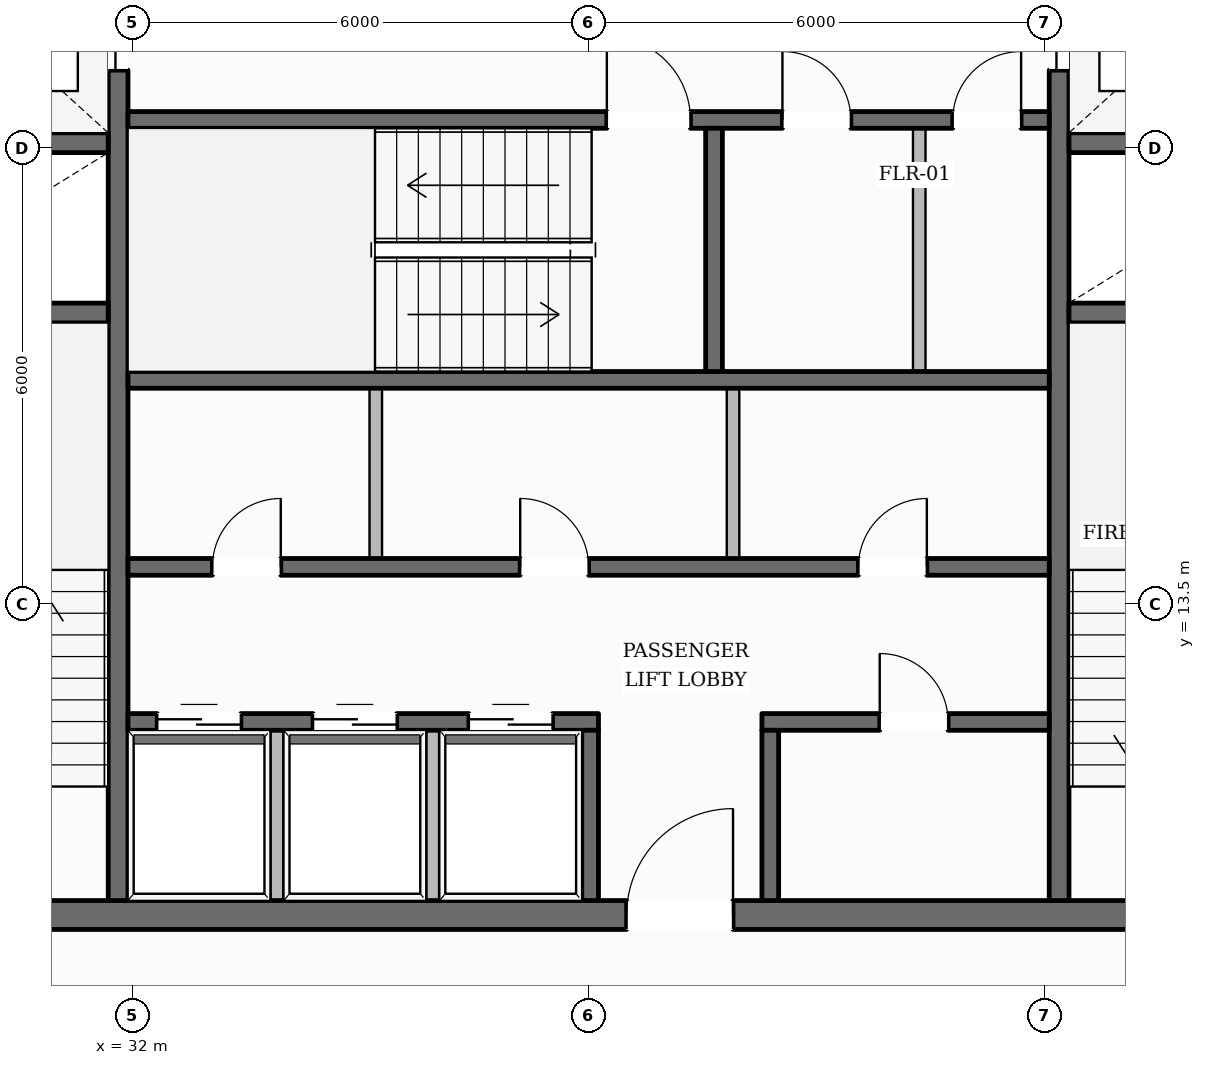
"""IFC4 building model, lengths in metres.
Left out: names, types, materials, properties, quantities, classifications, styles, units other than length and angle.
Written with IfcOpenShell. Run it as: python <this file> out.ifc"""

import sys

from ifc_helpers import new_model, si_unit, direction, frame, frame_2d, origin, place, context, subcontext, project, spatial, rectangle, extrude, element, fill, save


model = new_model("IFC4")
c1 = context("Model", 3, precision=1e-05, world=origin(), true_north=direction((0.0, 1.0)))
c2 = subcontext(c1, "Body", "Model", "MODEL_VIEW")
j1 = project(units=[si_unit("LENGTHUNIT", "METRE"), si_unit("PLANEANGLEUNIT", "RADIAN")], contexts=[c1])
p1 = place(None, origin())
s1 = spatial("IfcSite", under=j1, at=p1, CompositionType="ELEMENT")
p2 = place(p1, origin())
s2 = spatial("IfcBuilding", under=s1, at=p2, CompositionType="ELEMENT")
p3 = place(p2, frame((0.0, 0.0, 243.35)))
s3 = spatial("IfcBuildingStorey", under=s2, at=p3, CompositionType="ELEMENT", Elevation=243.35)
p4 = place(p3, frame((28.1, 9.41, 0.0), z_axis=(0.0, 0.0, 1.0), x_axis=(1.0, 0.0, 0.0)))
e1 = element("IfcWall", 1, at=p4, inside=s3, PredefinedType="SOLIDWALL", context=c2, shape_type="SweptSolid", body=[
    extrude(rectangle(XDim=19.8, YDim=0.38, at=frame_2d((9.9, 0.0))), origin(), (0.0, 0.0, 1.0), 3.61),
])
p5 = place(p4, frame((10.4, 0.0, 0.0)))
e2 = element("IfcOpeningElement", 2, at=p5, cuts=e1, PredefinedType="OPENING", context=c2, shape_type="SweptSolid", body=[
    extrude(rectangle(XDim=1.4, YDim=2.2, at=frame_2d((0.7, 1.1))), frame((0.0, 0.2, 0.0), z_axis=(0.0, -1.0, 0.0), x_axis=(1.0, 0.0, 0.0)), (0.0, 0.0, 1.0), 0.4),
])
p6 = place(p3, frame((31.81, 9.6, 0.0), z_axis=(0.0, 0.0, 1.0), x_axis=(0.0, 1.0, 0.0)))
e3 = element("IfcWall", 3, at=p6, inside=s3, PredefinedType="SHEAR", context=c2, shape_type="SweptSolid", body=[
    extrude(rectangle(XDim=13.0, YDim=0.26, at=frame_2d((6.5, 0.0))), origin(), (0.0, 0.0, 1.0), 3.61),
])
p7 = place(p6, frame((10.925, 0.0, 0.0)))
e4 = element("IfcOpeningElement", 4, at=p7, cuts=e3, PredefinedType="OPENING", context=c2, shape_type="SweptSolid", body=[
    extrude(rectangle(XDim=1.25, YDim=2.25, at=frame_2d((0.625, 1.125))), frame((0.0, 0.14, 0.0), z_axis=(0.0, -1.0, 0.0), x_axis=(1.0, 0.0, 0.0)), (0.0, 0.0, 1.0), 0.28),
])
p8 = place(p3, frame((44.19, 9.6, 0.0), z_axis=(0.0, 0.0, 1.0), x_axis=(0.0, 1.0, 0.0)))
e5 = element("IfcWall", 5, at=p8, inside=s3, PredefinedType="SHEAR", context=c2, shape_type="SweptSolid", body=[
    extrude(rectangle(XDim=13.0, YDim=0.26, at=frame_2d((6.5, 0.0))), origin(), (0.0, 0.0, 1.0), 3.61),
])
p9 = place(p8, frame((10.925, 0.0, 0.0)))
e6 = element("IfcOpeningElement", 6, at=p9, cuts=e5, PredefinedType="OPENING", context=c2, shape_type="SweptSolid", body=[
    extrude(rectangle(XDim=1.25, YDim=2.25, at=frame_2d((0.625, 1.125))), frame((0.0, 0.14, 0.0), z_axis=(0.0, -1.0, 0.0), x_axis=(1.0, 0.0, 0.0)), (0.0, 0.0, 1.0), 0.28),
])
for number, where, z_axis, x_axis in (
    (7, (28.48, 17.33, 0.0), (0.0, 0.0, 1.0), (1.0, 0.0, 0.0)),
    (8, (28.48, 19.57, 0.0), (0.0, 0.0, 1.0), (1.0, 0.0, 0.0)),
    (9, (44.32, 17.33, 0.0), (0.0, 0.0, 1.0), (1.0, 0.0, 0.0)),
    (10, (44.32, 19.57, 0.0), (0.0, 0.0, 1.0), (1.0, 0.0, 0.0)),
):
    element("IfcWall", number, at=place(p3, frame(where, z_axis=z_axis, x_axis=x_axis)), inside=s3, PredefinedType="SHEAR", context=c2, shape_type="SweptSolid", body=[
        extrude(rectangle(XDim=3.2, YDim=0.26, at=frame_2d((1.6, 0.0))), origin(), (0.0, 0.0, 1.0), 3.61),
    ])
p10 = place(p3, frame((31.94, 19.87, 0.0), z_axis=(0.0, 0.0, 1.0), x_axis=(1.0, 0.0, 0.0)))
e11 = element("IfcWall", 11, at=p10, inside=s3, PredefinedType="SOLIDWALL", context=c2, shape_type="SweptSolid", body=[
    extrude(rectangle(XDim=12.12, YDim=0.22, at=frame_2d((6.06, 0.0))), origin(), (0.0, 0.0, 1.0), 3.61),
])
p11 = place(p10, frame((6.3, 0.0, 0.0)))
e12 = element("IfcOpeningElement", 12, at=p11, cuts=e11, PredefinedType="OPENING", context=c2, shape_type="SweptSolid", body=[
    extrude(rectangle(XDim=1.1, YDim=2.15, at=frame_2d((0.55, 1.075))), frame((0.0, 0.12, 0.0), z_axis=(0.0, -1.0, 0.0), x_axis=(1.0, 0.0, 0.0)), (0.0, 0.0, 1.0), 0.24),
])
p12 = place(p10, frame((8.61, 0.0, 0.0)))
e13 = element("IfcOpeningElement", 13, at=p12, cuts=e11, PredefinedType="OPENING", context=c2, shape_type="SweptSolid", body=[
    extrude(rectangle(XDim=0.9, YDim=2.1, at=frame_2d((0.45, 1.05))), frame((0.0, 0.12, 0.0), z_axis=(0.0, -1.0, 0.0), x_axis=(1.0, 0.0, 0.0)), (0.0, 0.0, 1.0), 0.24),
])
p13 = place(p10, frame((10.85, 0.0, 0.0)))
e14 = element("IfcOpeningElement", 14, at=p13, cuts=e11, PredefinedType="OPENING", context=c2, shape_type="SweptSolid", body=[
    extrude(rectangle(XDim=0.9, YDim=2.1, at=frame_2d((0.45, 1.05))), frame((0.0, 0.12, 0.0), z_axis=(0.0, -1.0, 0.0), x_axis=(1.0, 0.0, 0.0)), (0.0, 0.0, 1.0), 0.24),
])
p14 = place(p3, frame((31.94, 16.45, 0.0), z_axis=(0.0, 0.0, 1.0), x_axis=(1.0, 0.0, 0.0)))
e15 = element("IfcWall", 15, at=p14, inside=s3, PredefinedType="SOLIDWALL", context=c2, shape_type="SweptSolid", body=[
    extrude(rectangle(XDim=12.12, YDim=0.22, at=frame_2d((6.06, 0.0))), origin(), (0.0, 0.0, 1.0), 3.61),
])
p15 = place(p3, frame((39.65, 16.56, 0.0), z_axis=(0.0, 0.0, 1.0), x_axis=(0.0, 1.0, 0.0)))
e16 = element("IfcWall", 16, at=p15, inside=s3, PredefinedType="SOLIDWALL", context=c2, shape_type="SweptSolid", body=[
    extrude(rectangle(XDim=3.2, YDim=0.22, at=frame_2d((1.6, 0.0))), origin(), (0.0, 0.0, 1.0), 3.61),
])
p16 = place(p3, frame((31.94, 13.99, 0.0), z_axis=(0.0, 0.0, 1.0), x_axis=(1.0, 0.0, 0.0)))
e17 = element("IfcWall", 17, at=p16, inside=s3, PredefinedType="SOLIDWALL", context=c2, shape_type="SweptSolid", body=[
    extrude(rectangle(XDim=12.12, YDim=0.22, at=frame_2d((6.06, 0.0))), origin(), (0.0, 0.0, 1.0), 3.61),
])
p17 = place(p16, frame((1.11, 0.0, 0.0)))
e18 = element("IfcOpeningElement", 18, at=p17, cuts=e17, PredefinedType="OPENING", context=c2, shape_type="SweptSolid", body=[
    extrude(rectangle(XDim=0.9, YDim=2.1, at=frame_2d((0.45, 1.05))), frame((0.0, 0.12, 0.0), z_axis=(0.0, -1.0, 0.0), x_axis=(1.0, 0.0, 0.0)), (0.0, 0.0, 1.0), 0.24),
])
p18 = place(p16, frame((5.16, 0.0, 0.0)))
e19 = element("IfcOpeningElement", 19, at=p18, cuts=e17, PredefinedType="OPENING", context=c2, shape_type="SweptSolid", body=[
    extrude(rectangle(XDim=0.9, YDim=2.1, at=frame_2d((0.45, 1.05))), frame((0.0, 0.12, 0.0), z_axis=(0.0, -1.0, 0.0), x_axis=(1.0, 0.0, 0.0)), (0.0, 0.0, 1.0), 0.24),
])
p19 = place(p16, frame((9.61, 0.0, 0.0)))
e20 = element("IfcOpeningElement", 20, at=p19, cuts=e17, PredefinedType="OPENING", context=c2, shape_type="SweptSolid", body=[
    extrude(rectangle(XDim=0.9, YDim=2.1, at=frame_2d((0.45, 1.05))), frame((0.0, 0.12, 0.0), z_axis=(0.0, -1.0, 0.0), x_axis=(1.0, 0.0, 0.0)), (0.0, 0.0, 1.0), 0.24),
])
p20 = place(p3, frame((31.94, 11.95, 0.0), z_axis=(0.0, 0.0, 1.0), x_axis=(1.0, 0.0, 0.0)))
e21 = element("IfcWall", 21, at=p20, inside=s3, PredefinedType="SOLIDWALL", context=c2, shape_type="SweptSolid", body=[
    extrude(rectangle(XDim=6.19, YDim=0.22, at=frame_2d((3.095, 0.0))), origin(), (0.0, 0.0, 1.0), 3.61),
])
p21 = place(p20, frame((0.385, 0.0, 0.0)))
e22 = element("IfcOpeningElement", 22, at=p21, cuts=e21, PredefinedType="OPENING", context=c2, shape_type="SweptSolid", body=[
    extrude(rectangle(XDim=1.1, YDim=2.2, at=frame_2d((0.55, 1.1))), frame((0.0, 0.12, 0.0), z_axis=(0.0, -1.0, 0.0), x_axis=(1.0, 0.0, 0.0)), (0.0, 0.0, 1.0), 0.24),
])
p22 = place(p20, frame((2.435, 0.0, 0.0)))
e23 = element("IfcOpeningElement", 23, at=p22, cuts=e21, PredefinedType="OPENING", context=c2, shape_type="SweptSolid", body=[
    extrude(rectangle(XDim=1.1, YDim=2.2, at=frame_2d((0.55, 1.1))), frame((0.0, 0.12, 0.0), z_axis=(0.0, -1.0, 0.0), x_axis=(1.0, 0.0, 0.0)), (0.0, 0.0, 1.0), 0.24),
])
p23 = place(p20, frame((4.485, 0.0, 0.0)))
e24 = element("IfcOpeningElement", 24, at=p23, cuts=e21, PredefinedType="OPENING", context=c2, shape_type="SweptSolid", body=[
    extrude(rectangle(XDim=1.1, YDim=2.2, at=frame_2d((0.55, 1.1))), frame((0.0, 0.12, 0.0), z_axis=(0.0, -1.0, 0.0), x_axis=(1.0, 0.0, 0.0)), (0.0, 0.0, 1.0), 0.24),
])
p24 = place(p3, frame((40.28, 11.95, 0.0), z_axis=(0.0, 0.0, 1.0), x_axis=(1.0, 0.0, 0.0)))
e25 = element("IfcWall", 25, at=p24, inside=s3, PredefinedType="SOLIDWALL", context=c2, shape_type="SweptSolid", body=[
    extrude(rectangle(XDim=3.78, YDim=0.22, at=frame_2d((1.89, 0.0))), origin(), (0.0, 0.0, 1.0), 3.61),
])
p25 = place(p24, frame((1.55, 0.0, 0.0)))
e26 = element("IfcOpeningElement", 26, at=p25, cuts=e25, PredefinedType="OPENING", context=c2, shape_type="SweptSolid", body=[
    extrude(rectangle(XDim=0.9, YDim=2.1, at=frame_2d((0.45, 1.05))), frame((0.0, 0.12, 0.0), z_axis=(0.0, -1.0, 0.0), x_axis=(1.0, 0.0, 0.0)), (0.0, 0.0, 1.0), 0.24),
])
for number, where, z_axis, x_axis in (
    (27, (38.02, 9.6, 0.0), (0.0, 0.0, 1.0), (0.0, 1.0, 0.0)),
    (28, (40.39, 9.6, 0.0), (0.0, 0.0, 1.0), (0.0, 1.0, 0.0)),
):
    element("IfcWall", number, at=place(p3, frame(where, z_axis=z_axis, x_axis=x_axis)), inside=s3, PredefinedType="SOLIDWALL", context=c2, shape_type="SweptSolid", body=[
        extrude(rectangle(XDim=2.24, YDim=0.22, at=frame_2d((1.12, 0.0))), origin(), (0.0, 0.0, 1.0), 3.61),
    ])
p26 = place(p3, frame((16.275, 11.379, 0.0), z_axis=(0.0, 0.0, 1.0), x_axis=(0.490746172412, 0.871302584791, 0.0)))
e29 = element("IfcWall", 29, at=p26, inside=s3, PredefinedType="STANDARD", context=c2, shape_type="SweptSolid", body=[
    extrude(rectangle(XDim=37.617, YDim=0.35, at=frame_2d((18.809, 0.0))), origin(), (0.0, 0.0, 1.0), 3.196),
])
p27 = place(p26, frame((33.404, 0.0, 0.65)))
e30 = element("IfcOpeningElement", 30, at=p27, cuts=e29, PredefinedType="OPENING", context=c2, shape_type="SweptSolid", body=[
    extrude(rectangle(XDim=1.35, YDim=1.75, at=frame_2d((0.675, 0.875))), frame((0.0, 0.185, 0.0), z_axis=(0.0, -1.0, 0.0), x_axis=(1.0, 0.0, 0.0)), (0.0, 0.0, 1.0), 0.37),
])
p28 = place(p26, frame((27.294, 0.0, 0.65)))
e31 = element("IfcOpeningElement", 31, at=p28, cuts=e29, PredefinedType="OPENING", context=c2, shape_type="SweptSolid", body=[
    extrude(rectangle(XDim=1.35, YDim=1.75, at=frame_2d((0.675, 0.875))), frame((0.0, 0.185, 0.0), z_axis=(0.0, -1.0, 0.0), x_axis=(1.0, 0.0, 0.0)), (0.0, 0.0, 1.0), 0.37),
])
p29 = place(p26, frame((15.073, 0.0, 0.65)))
e32 = element("IfcOpeningElement", 32, at=p29, cuts=e29, PredefinedType="OPENING", context=c2, shape_type="SweptSolid", body=[
    extrude(rectangle(XDim=1.35, YDim=1.75, at=frame_2d((0.675, 0.875))), frame((0.0, 0.185, 0.0), z_axis=(0.0, -1.0, 0.0), x_axis=(1.0, 0.0, 0.0)), (0.0, 0.0, 1.0), 0.37),
])
p30 = place(p26, frame((8.963, 0.0, 0.65)))
e33 = element("IfcOpeningElement", 33, at=p30, cuts=e29, PredefinedType="OPENING", context=c2, shape_type="SweptSolid", body=[
    extrude(rectangle(XDim=1.35, YDim=1.75, at=frame_2d((0.675, 0.875))), frame((0.0, 0.185, 0.0), z_axis=(0.0, -1.0, 0.0), x_axis=(1.0, 0.0, 0.0)), (0.0, 0.0, 1.0), 0.37),
])
p31 = place(p26, frame((2.853, 0.0, 0.65)))
e34 = element("IfcOpeningElement", 34, at=p31, cuts=e29, PredefinedType="OPENING", context=c2, shape_type="SweptSolid", body=[
    extrude(rectangle(XDim=1.35, YDim=1.75, at=frame_2d((0.675, 0.875))), frame((0.0, 0.185, 0.0), z_axis=(0.0, -1.0, 0.0), x_axis=(1.0, 0.0, 0.0)), (0.0, 0.0, 1.0), 0.37),
])
p32 = place(p3, frame((41.362, 44.097, 0.0), z_axis=(0.0, 0.0, 1.0), x_axis=(0.497556414716, -0.867431619308, 0.0)))
e35 = element("IfcWall", 35, at=p32, inside=s3, PredefinedType="STANDARD", context=c2, shape_type="SweptSolid", body=[
    extrude(rectangle(XDim=38.118, YDim=0.35, at=frame_2d((19.059, 0.0))), origin(), (0.0, 0.0, 1.0), 3.196),
])
p33 = place(p32, frame((33.873, 0.0, 0.65)))
e36 = element("IfcOpeningElement", 36, at=p33, cuts=e35, PredefinedType="OPENING", context=c2, shape_type="SweptSolid", body=[
    extrude(rectangle(XDim=1.35, YDim=1.75, at=frame_2d((0.675, 0.875))), frame((0.0, 0.185, 0.0), z_axis=(0.0, -1.0, 0.0), x_axis=(1.0, 0.0, 0.0)), (0.0, 0.0, 1.0), 0.37),
])
p34 = place(p32, frame((27.678, 0.0, 0.65)))
e37 = element("IfcOpeningElement", 37, at=p34, cuts=e35, PredefinedType="OPENING", context=c2, shape_type="SweptSolid", body=[
    extrude(rectangle(XDim=1.35, YDim=1.75, at=frame_2d((0.675, 0.875))), frame((0.0, 0.185, 0.0), z_axis=(0.0, -1.0, 0.0), x_axis=(1.0, 0.0, 0.0)), (0.0, 0.0, 1.0), 0.37),
])
p35 = place(p32, frame((15.288, 0.0, 0.65)))
e38 = element("IfcOpeningElement", 38, at=p35, cuts=e35, PredefinedType="OPENING", context=c2, shape_type="SweptSolid", body=[
    extrude(rectangle(XDim=1.35, YDim=1.75, at=frame_2d((0.675, 0.875))), frame((0.0, 0.185, 0.0), z_axis=(0.0, -1.0, 0.0), x_axis=(1.0, 0.0, 0.0)), (0.0, 0.0, 1.0), 0.37),
])
p36 = place(p32, frame((9.093, 0.0, 0.65)))
e39 = element("IfcOpeningElement", 39, at=p36, cuts=e35, PredefinedType="OPENING", context=c2, shape_type="SweptSolid", body=[
    extrude(rectangle(XDim=1.35, YDim=1.75, at=frame_2d((0.675, 0.875))), frame((0.0, 0.185, 0.0), z_axis=(0.0, -1.0, 0.0), x_axis=(1.0, 0.0, 0.0)), (0.0, 0.0, 1.0), 0.37),
])
p37 = place(p32, frame((2.898, 0.0, 0.65)))
e40 = element("IfcOpeningElement", 40, at=p37, cuts=e35, PredefinedType="OPENING", context=c2, shape_type="SweptSolid", body=[
    extrude(rectangle(XDim=1.35, YDim=1.75, at=frame_2d((0.675, 0.875))), frame((0.0, 0.185, 0.0), z_axis=(0.0, -1.0, 0.0), x_axis=(1.0, 0.0, 0.0)), (0.0, 0.0, 1.0), 0.37),
])
for number, where, z_axis, x_axis in (
    (41, (33.9, 9.49, 0.0), (0.0, 0.0, 1.0), (0.0, 1.0, 0.0)),
    (42, (35.95, 9.49, 0.0), (0.0, 0.0, 1.0), (0.0, 1.0, 0.0)),
):
    element("IfcWall", number, at=place(p3, frame(where, z_axis=z_axis, x_axis=x_axis)), inside=s3, PredefinedType="PARTITIONING", context=c2, shape_type="SweptSolid", body=[
        extrude(rectangle(XDim=2.35, YDim=0.165, at=frame_2d((1.175, 0.0))), origin(), (0.0, 0.0, 1.0), 3.61),
    ])
for number, where, z_axis, x_axis in (
    (43, (35.2, 14.1, 0.0), (0.0, 0.0, 1.0), (0.0, 1.0, 0.0)),
    (44, (39.9, 14.1, 0.0), (0.0, 0.0, 1.0), (0.0, 1.0, 0.0)),
):
    element("IfcWall", number, at=place(p3, frame(where, z_axis=z_axis, x_axis=x_axis)), inside=s3, PredefinedType="PARTITIONING", context=c2, shape_type="SweptSolid", body=[
        extrude(rectangle(XDim=2.24, YDim=0.165, at=frame_2d((1.12, 0.0))), origin(), (0.0, 0.0, 1.0), 3.61),
    ])
p38 = place(p3, frame((42.35, 16.56, 0.0), z_axis=(0.0, 0.0, 1.0), x_axis=(0.0, 1.0, 0.0)))
e45 = element("IfcWall", 45, at=p38, inside=s3, PredefinedType="PARTITIONING", context=c2, shape_type="SweptSolid", body=[
    extrude(rectangle(XDim=3.2, YDim=0.165, at=frame_2d((1.6, 0.0))), origin(), (0.0, 0.0, 1.0), 3.61),
])
p39 = place(p11, origin())
e46 = element("IfcDoor", 46, at=p39, inside=s3, OperationType="SINGLE_SWING_LEFT", PredefinedType="DOOR", context=c2, shape_type="SweptSolid", body=[
    extrude(rectangle(XDim=1.1, YDim=2.15, at=frame_2d((0.55, 1.075))), frame((0.0, 0.025, 0.0), z_axis=(0.0, -1.0, 0.0), x_axis=(1.0, 0.0, 0.0)), (0.0, 0.0, 1.0), 0.05),
])
fill(e12, e46)
p40 = place(p7, origin())
e47 = element("IfcDoor", 47, at=p40, inside=s3, OperationType="DOUBLE_DOOR_SLIDING", PredefinedType="DOOR", context=c2, shape_type="SweptSolid", body=[
    extrude(rectangle(XDim=1.25, YDim=2.25, at=frame_2d((0.625, 1.125))), frame((0.0, 0.025, 0.0), z_axis=(0.0, -1.0, 0.0), x_axis=(1.0, 0.0, 0.0)), (0.0, 0.0, 1.0), 0.05),
])
fill(e4, e47)
p41 = place(p9, origin())
e48 = element("IfcDoor", 48, at=p41, inside=s3, OperationType="DOUBLE_DOOR_SLIDING", PredefinedType="DOOR", context=c2, shape_type="SweptSolid", body=[
    extrude(rectangle(XDim=1.25, YDim=2.25, at=frame_2d((0.625, 1.125))), frame((0.0, 0.025, 0.0), z_axis=(0.0, -1.0, 0.0), x_axis=(1.0, 0.0, 0.0)), (0.0, 0.0, 1.0), 0.05),
])
fill(e6, e48)
p42 = place(p5, origin())
e49 = element("IfcDoor", 49, at=p42, inside=s3, OperationType="SINGLE_SWING_RIGHT", PredefinedType="DOOR", context=c2, shape_type="SweptSolid", body=[
    extrude(rectangle(XDim=1.4, YDim=2.2, at=frame_2d((0.7, 1.1))), frame((0.0, 0.025, 0.0), z_axis=(0.0, -1.0, 0.0), x_axis=(1.0, 0.0, 0.0)), (0.0, 0.0, 1.0), 0.05),
])
fill(e2, e49)
p43 = place(p21, origin())
e50 = element("IfcDoor", 50, at=p43, inside=s3, OperationType="DOUBLE_DOOR_SLIDING", PredefinedType="DOOR", context=c2, shape_type="SweptSolid", body=[
    extrude(rectangle(XDim=1.1, YDim=2.2, at=frame_2d((0.55, 1.1))), frame((0.0, 0.025, 0.0), z_axis=(0.0, -1.0, 0.0), x_axis=(1.0, 0.0, 0.0)), (0.0, 0.0, 1.0), 0.05),
])
fill(e22, e50)
p44 = place(p22, origin())
e51 = element("IfcDoor", 51, at=p44, inside=s3, OperationType="DOUBLE_DOOR_SLIDING", PredefinedType="DOOR", context=c2, shape_type="SweptSolid", body=[
    extrude(rectangle(XDim=1.1, YDim=2.2, at=frame_2d((0.55, 1.1))), frame((0.0, 0.025, 0.0), z_axis=(0.0, -1.0, 0.0), x_axis=(1.0, 0.0, 0.0)), (0.0, 0.0, 1.0), 0.05),
])
fill(e23, e51)
p45 = place(p23, origin())
e52 = element("IfcDoor", 52, at=p45, inside=s3, OperationType="DOUBLE_DOOR_SLIDING", PredefinedType="DOOR", context=c2, shape_type="SweptSolid", body=[
    extrude(rectangle(XDim=1.1, YDim=2.2, at=frame_2d((0.55, 1.1))), frame((0.0, 0.025, 0.0), z_axis=(0.0, -1.0, 0.0), x_axis=(1.0, 0.0, 0.0)), (0.0, 0.0, 1.0), 0.05),
])
fill(e24, e52)
p46 = place(p17, origin())
e53 = element("IfcDoor", 53, at=p46, inside=s3, OperationType="SINGLE_SWING_RIGHT", PredefinedType="DOOR", context=c2, shape_type="SweptSolid", body=[
    extrude(rectangle(XDim=0.9, YDim=2.1, at=frame_2d((0.45, 1.05))), frame((0.0, 0.025, 0.0), z_axis=(0.0, -1.0, 0.0), x_axis=(1.0, 0.0, 0.0)), (0.0, 0.0, 1.0), 0.05),
])
fill(e18, e53)
p47 = place(p18, origin())
e54 = element("IfcDoor", 54, at=p47, inside=s3, OperationType="SINGLE_SWING_LEFT", PredefinedType="DOOR", context=c2, shape_type="SweptSolid", body=[
    extrude(rectangle(XDim=0.9, YDim=2.1, at=frame_2d((0.45, 1.05))), frame((0.0, 0.025, 0.0), z_axis=(0.0, -1.0, 0.0), x_axis=(1.0, 0.0, 0.0)), (0.0, 0.0, 1.0), 0.05),
])
fill(e19, e54)
p48 = place(p19, origin())
e55 = element("IfcDoor", 55, at=p48, inside=s3, OperationType="SINGLE_SWING_RIGHT", PredefinedType="DOOR", context=c2, shape_type="SweptSolid", body=[
    extrude(rectangle(XDim=0.9, YDim=2.1, at=frame_2d((0.45, 1.05))), frame((0.0, 0.025, 0.0), z_axis=(0.0, -1.0, 0.0), x_axis=(1.0, 0.0, 0.0)), (0.0, 0.0, 1.0), 0.05),
])
fill(e20, e55)
p49 = place(p12, origin())
e56 = element("IfcDoor", 56, at=p49, inside=s3, OperationType="SINGLE_SWING_LEFT", PredefinedType="DOOR", context=c2, shape_type="SweptSolid", body=[
    extrude(rectangle(XDim=0.9, YDim=2.1, at=frame_2d((0.45, 1.05))), frame((0.0, 0.025, 0.0), z_axis=(0.0, -1.0, 0.0), x_axis=(1.0, 0.0, 0.0)), (0.0, 0.0, 1.0), 0.05),
])
fill(e13, e56)
p50 = place(p13, origin())
e57 = element("IfcDoor", 57, at=p50, inside=s3, OperationType="SINGLE_SWING_RIGHT", PredefinedType="DOOR", context=c2, shape_type="SweptSolid", body=[
    extrude(rectangle(XDim=0.9, YDim=2.1, at=frame_2d((0.45, 1.05))), frame((0.0, 0.025, 0.0), z_axis=(0.0, -1.0, 0.0), x_axis=(1.0, 0.0, 0.0)), (0.0, 0.0, 1.0), 0.05),
])
fill(e14, e57)
p51 = place(p25, origin())
e58 = element("IfcDoor", 58, at=p51, inside=s3, OperationType="SINGLE_SWING_LEFT", PredefinedType="DOOR", context=c2, shape_type="SweptSolid", body=[
    extrude(rectangle(XDim=0.9, YDim=2.1, at=frame_2d((0.45, 1.05))), frame((0.0, 0.025, 0.0), z_axis=(0.0, -1.0, 0.0), x_axis=(1.0, 0.0, 0.0)), (0.0, 0.0, 1.0), 0.05),
])
fill(e26, e58)
save(model, sys.argv[1])
